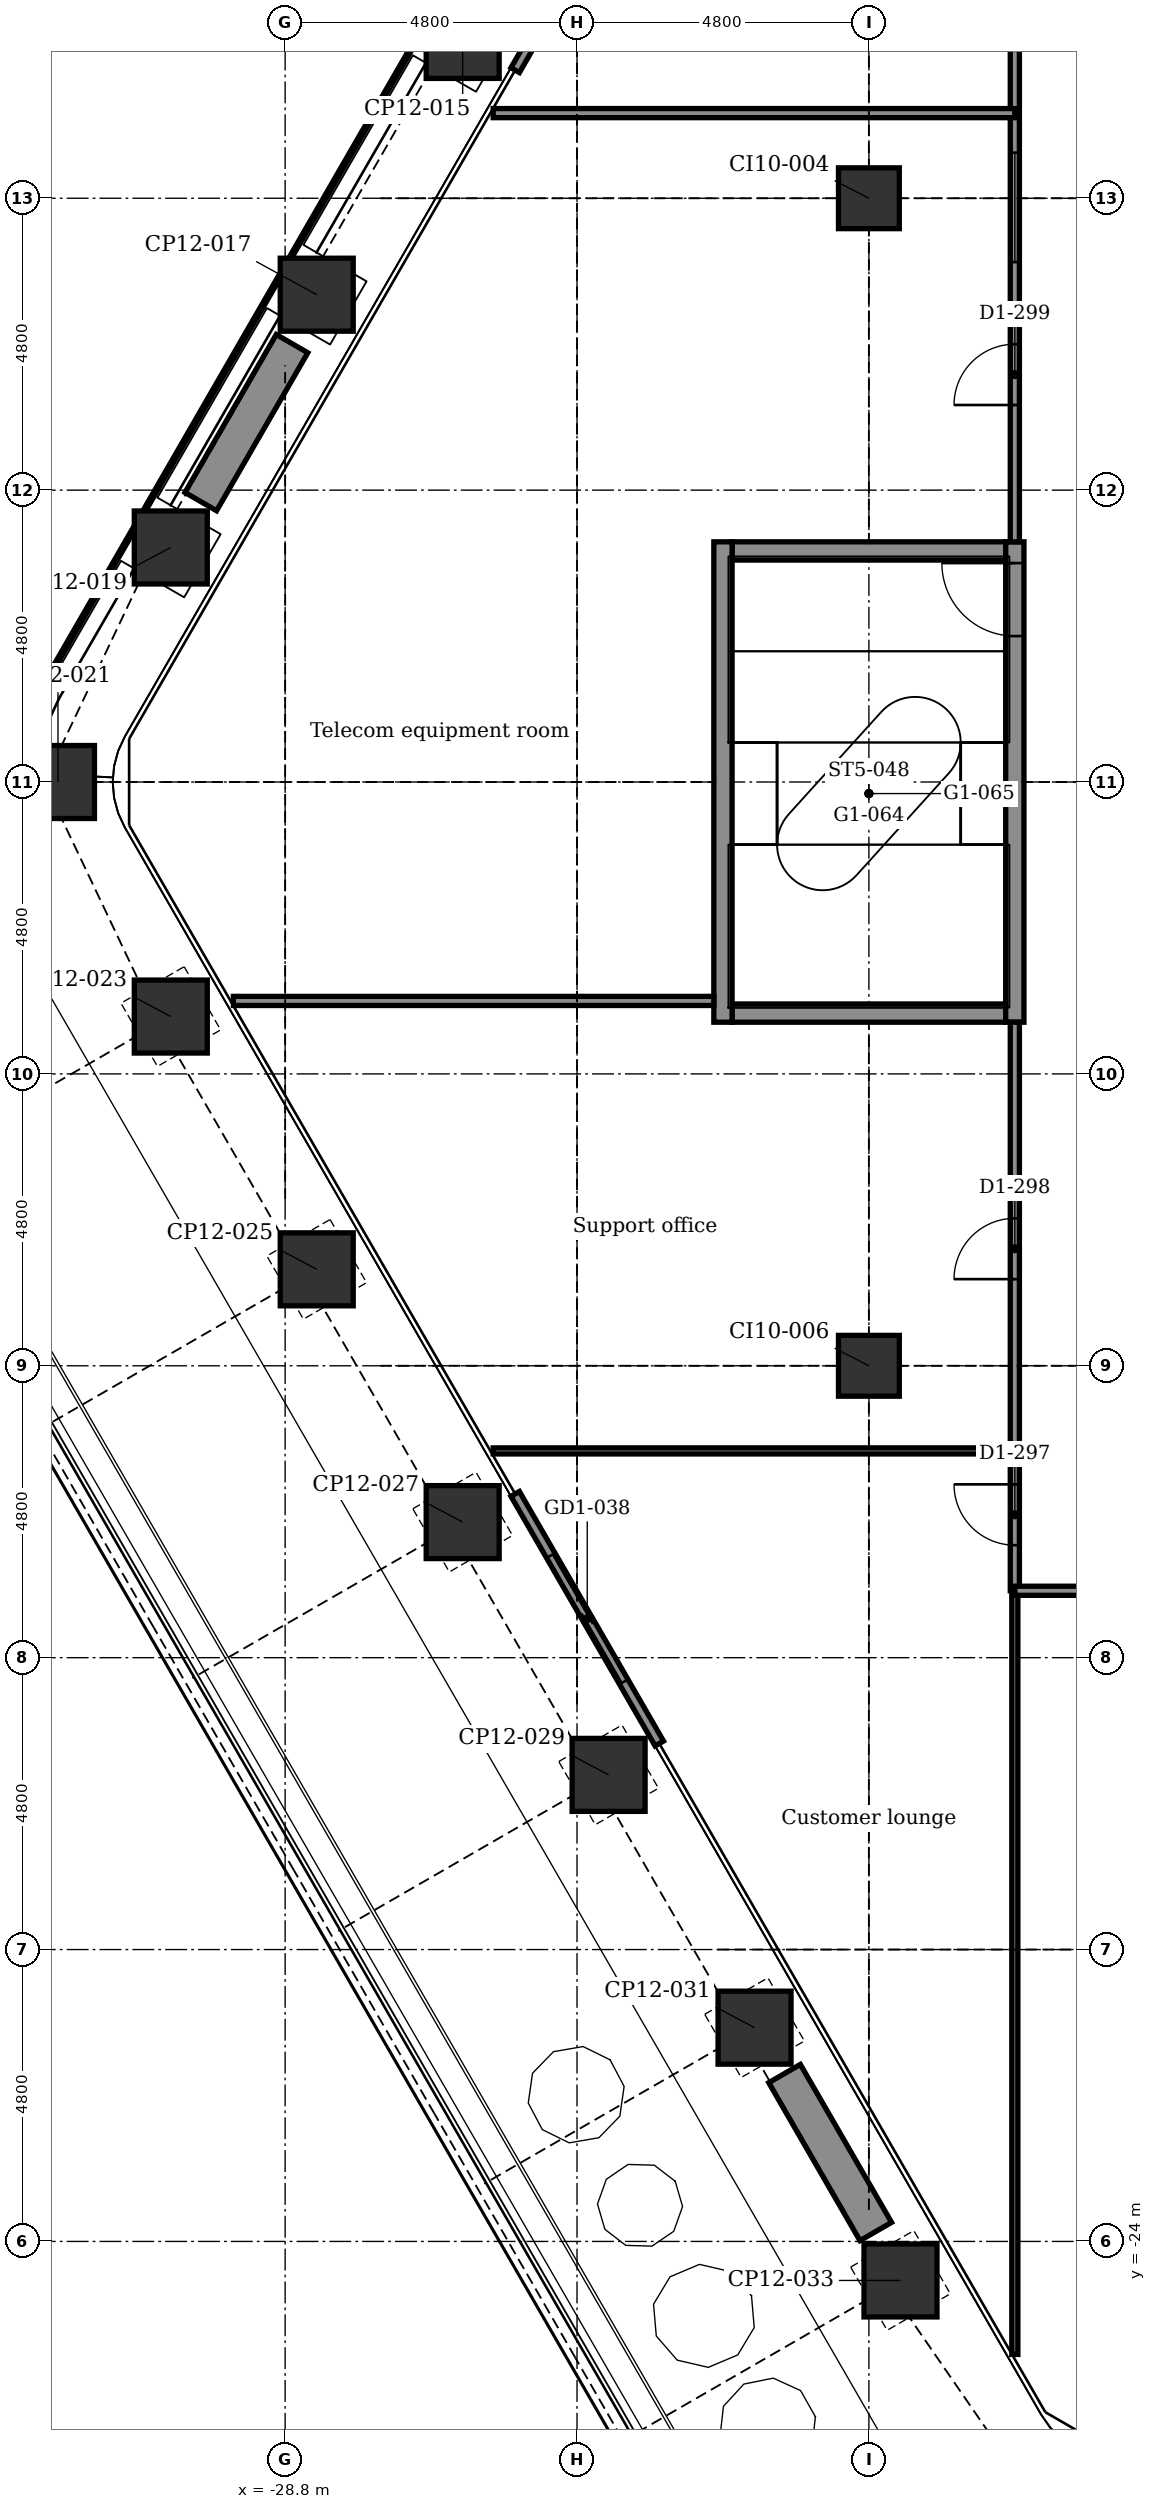
"""IFC4 building model, lengths in metres.
Left out: names, types, materials, properties, quantities, classifications, styles, units other than length and angle.
Written with IfcOpenShell. Run it as: python <this file> out.ifc"""

import sys

from ifc_helpers import new_model, si_unit, direction, frame, frame_2d, origin, origin_2d, place, context, subcontext, project, spatial, rectangle, extrude, element, fill, save


model = new_model("IFC4")
c1 = context("Model", 3, precision=1e-05, world=origin(), true_north=direction((0.0, 1.0)))
c2 = subcontext(c1, "Body", "Model", "MODEL_VIEW")
j1 = project(units=[si_unit("LENGTHUNIT", "METRE"), si_unit("PLANEANGLEUNIT", "RADIAN")], contexts=[c1])
p1 = place(None, origin())
s1 = spatial("IfcSite", under=j1, at=p1, CompositionType="ELEMENT")
p2 = place(p1, origin())
s2 = spatial("IfcBuilding", under=s1, at=p2, CompositionType="ELEMENT")
p3 = place(p2, frame((0.0, 0.0, 109.4)))
s3 = spatial("IfcBuildingStorey", under=s2, at=p3, CompositionType="ELEMENT", Elevation=109.4)
for number, where, z_axis, x_axis in (
    (1, (-18.68, -24.642, -0.2), (0.0, 0.0, 1.0), (0.866, 0.5, 0.0)),
    (2, (-21.08, -20.485, -0.2), (0.0, 0.0, 1.0), (0.866, 0.5, 0.0)),
    (3, (-23.48, -16.328, -0.2), (0.0, 0.0, 1.0), (0.866, 0.5, 0.0)),
    (4, (-25.88, -12.171, -0.2), (0.0, 0.0, 1.0), (0.866, 0.5, 0.0)),
    (5, (-28.28, -8.014, -0.2), (0.0, 0.0, 1.0), (0.866, 0.5, 0.0)),
    (6, (-30.68, -3.857, -0.2), (0.0, 0.0, 1.0), (0.866, 0.5, 0.0)),
    (7, (-32.536, 0.0, -0.2), (0.0, 0.0, 1.0), (1.0, 0.0, 0.0)),
    (8, (-30.68, 3.857, -0.2), (0.0, 0.0, 1.0), (0.5, 0.866, 0.0)),
    (9, (-28.28, 8.014, -0.2), (0.0, 0.0, 1.0), (0.5, 0.866, 0.0)),
    (10, (-25.88, 12.171, -0.2), (0.0, 0.0, 1.0), (0.5, 0.866, 0.0)),
):
    element("IfcColumn", number, at=place(p3, frame(where, z_axis=z_axis, x_axis=x_axis)), inside=s3, PredefinedType="COLUMN", context=c2, shape_type="SweptSolid", body=[
        extrude(rectangle(XDim=1.2, YDim=1.2, at=origin_2d()), origin(), (0.0, 0.0, 1.0), 4.5),
    ])
for number, where, z_axis, x_axis in (
    (11, (-19.2, -9.6, -0.2), (0.0, 0.0, 1.0), (1.0, 0.0, 0.0)),
    (12, (-19.2, 9.6, -0.2), (0.0, 0.0, 1.0), (1.0, 0.0, 0.0)),
):
    element("IfcColumn", number, at=place(p3, frame(where, z_axis=z_axis, x_axis=x_axis)), inside=s3, PredefinedType="COLUMN", context=c2, shape_type="SweptSolid", body=[
        extrude(rectangle(XDim=1.0, YDim=1.0, at=origin_2d()), origin(), (0.0, 0.0, 1.0), 4.5),
    ])
for number, where, z_axis, x_axis in (
    (13, (-21.45, -3.8, -0.2), (0.0, 0.0, 1.0), (1.0, 0.0, 0.0)),
    (14, (-21.45, 3.8, -0.2), (0.0, 0.0, 1.0), (1.0, 0.0, 0.0)),
):
    element("IfcWall", number, at=place(p3, frame(where, z_axis=z_axis, x_axis=x_axis)), inside=s3, PredefinedType="STANDARD", context=c2, shape_type="SweptSolid", body=[
        extrude(rectangle(XDim=4.5, YDim=0.3, at=frame_2d((2.25, 0.0))), origin(), (0.0, 0.0, 1.0), 4.5),
    ])
p4 = place(p3, frame((-21.6, -3.95, -0.2), z_axis=(0.0, 0.0, 1.0), x_axis=(0.0, 1.0, 0.0)))
e15 = element("IfcWall", 15, at=p4, inside=s3, PredefinedType="STANDARD", context=c2, shape_type="SweptSolid", body=[
    extrude(rectangle(XDim=7.9, YDim=0.3, at=frame_2d((3.95, 0.0))), origin(), (0.0, 0.0, 1.0), 4.5),
])
p5 = place(p3, frame((-16.8, -3.95, -0.2), z_axis=(0.0, 0.0, 1.0), x_axis=(0.0, 1.0, 0.0)))
e16 = element("IfcWall", 16, at=p5, inside=s3, PredefinedType="STANDARD", context=c2, shape_type="SweptSolid", body=[
    extrude(rectangle(XDim=7.9, YDim=0.3, at=frame_2d((3.95, 0.0))), origin(), (0.0, 0.0, 1.0), 4.5),
])
p6 = place(p5, frame((6.35, 0.0, 0.2)))
e17 = element("IfcOpeningElement", 17, at=p6, cuts=e16, PredefinedType="OPENING", context=c2, shape_type="SweptSolid", body=[
    extrude(rectangle(XDim=1.2, YDim=2.1, at=frame_2d((0.6, 1.05))), frame((0.0, 0.16, 0.0), z_axis=(0.0, -1.0, 0.0), x_axis=(1.0, 0.0, 0.0)), (0.0, 0.0, 1.0), 0.32),
])
p7 = place(p3, frame((-22.647, -15.812, 0.0), z_axis=(0.0, 0.0, 1.0), x_axis=(-0.499978080042, 0.866038058908, 0.0)))
e18 = element("IfcWall", 18, at=p7, inside=s3, PredefinedType="PARTITIONING", context=c2, shape_type="SweptSolid", body=[
    extrude(rectangle(XDim=4.74, YDim=0.16, at=frame_2d((2.37, 0.0))), origin(), (0.0, 0.0, 1.0), 4.3),
])
p8 = place(p7, frame((1.17, 0.0, 0.0)))
e19 = element("IfcOpeningElement", 19, at=p8, cuts=e18, PredefinedType="OPENING", context=c2, shape_type="SweptSolid", body=[
    extrude(rectangle(XDim=2.4, YDim=2.4, at=frame_2d((1.2, 1.2))), frame((0.0, 0.09, 0.0), z_axis=(0.0, -1.0, 0.0), x_axis=(1.0, 0.0, 0.0)), (0.0, 0.0, 1.0), 0.18),
])
p9 = place(p3, frame((-25.017, 11.707, 0.0), z_axis=(0.0, 0.0, 1.0), x_axis=(0.499978080042, 0.866038058908, 0.0)))
e20 = element("IfcWall", 20, at=p9, inside=s3, PredefinedType="PARTITIONING", context=c2, shape_type="SweptSolid", body=[
    extrude(rectangle(XDim=4.74, YDim=0.16, at=frame_2d((2.37, 0.0))), origin(), (0.0, 0.0, 1.0), 4.3),
])
p10 = place(p9, frame((1.17, 0.0, 0.0)))
e21 = element("IfcOpeningElement", 21, at=p10, cuts=e20, PredefinedType="OPENING", context=c2, shape_type="SweptSolid", body=[
    extrude(rectangle(XDim=2.4, YDim=2.4, at=frame_2d((1.2, 1.2))), frame((0.0, 0.09, 0.0), z_axis=(0.0, -1.0, 0.0), x_axis=(1.0, 0.0, 0.0)), (0.0, 0.0, 1.0), 0.18),
])
for number, where, z_axis, x_axis in (
    (22, (-19.087, -23.837, 0.0), (0.0, 0.0, 1.0), (-0.5, 0.866, 0.0)),
    (23, (-30.187, 4.611, 0.0), (0.0, 0.0, 1.0), (0.5, 0.866, 0.0)),
):
    element("IfcWall", number, at=place(p3, frame(where, z_axis=z_axis, x_axis=x_axis)), inside=s3, PredefinedType="USERDEFINED", context=c2, shape_type="SweptSolid", body=[
        extrude(rectangle(XDim=3.0, YDim=0.6, at=frame_2d((1.5, 0.0))), origin(), (0.0, 0.0, 1.0), 0.7),
    ])
p11 = place(p3, frame((-16.8, -25.858, 0.0), z_axis=(0.0, 0.0, 1.0), x_axis=(0.0, 1.0, 0.0)))
e24 = element("IfcWall", 24, at=p11, inside=s3, PredefinedType="PARTITIONING", context=c2, shape_type="SweptSolid", body=[
    extrude(rectangle(XDim=12.558, YDim=0.1, at=frame_2d((6.279, 0.0))), origin(), (0.0, 0.0, 1.0), 4.3),
])
p12 = place(p3, frame((-16.8, -13.3, 0.0), z_axis=(0.0, 0.0, 1.0), x_axis=(0.0, 1.0, 0.0)))
e25 = element("IfcWall", 25, at=p12, inside=s3, PredefinedType="PARTITIONING", context=c2, shape_type="SweptSolid", body=[
    extrude(rectangle(XDim=9.35, YDim=0.15, at=frame_2d((4.675, 0.0))), origin(), (0.0, 0.0, 1.0), 4.3),
])
p13 = place(p12, frame((0.75, 0.0, 0.0)))
e26 = element("IfcOpeningElement", 26, at=p13, cuts=e25, PredefinedType="OPENING", context=c2, shape_type="SweptSolid", body=[
    extrude(rectangle(XDim=1.0, YDim=2.1, at=frame_2d((0.5, 1.05))), frame((0.0, 0.085, 0.0), z_axis=(0.0, -1.0, 0.0), x_axis=(1.0, 0.0, 0.0)), (0.0, 0.0, 1.0), 0.17),
])
p14 = place(p12, frame((5.125, 0.0, 0.0)))
e27 = element("IfcOpeningElement", 27, at=p14, cuts=e25, PredefinedType="OPENING", context=c2, shape_type="SweptSolid", body=[
    extrude(rectangle(XDim=1.0, YDim=2.1, at=frame_2d((0.5, 1.05))), frame((0.0, 0.085, 0.0), z_axis=(0.0, -1.0, 0.0), x_axis=(1.0, 0.0, 0.0)), (0.0, 0.0, 1.0), 0.17),
])
p15 = place(p3, frame((-16.8, 3.95, 0.0), z_axis=(0.0, 0.0, 1.0), x_axis=(0.0, 1.0, 0.0)))
e28 = element("IfcWall", 28, at=p15, inside=s3, PredefinedType="PARTITIONING", context=c2, shape_type="SweptSolid", body=[
    extrude(rectangle(XDim=8.75, YDim=0.15, at=frame_2d((4.375, 0.0))), origin(), (0.0, 0.0, 1.0), 4.3),
])
p16 = place(p15, frame((2.25, 0.0, 0.0)))
e29 = element("IfcOpeningElement", 29, at=p16, cuts=e28, PredefinedType="OPENING", context=c2, shape_type="SweptSolid", body=[
    extrude(rectangle(XDim=1.0, YDim=2.1, at=frame_2d((0.5, 1.05))), frame((0.0, 0.085, 0.0), z_axis=(0.0, -1.0, 0.0), x_axis=(1.0, 0.0, 0.0)), (0.0, 0.0, 1.0), 0.17),
])
p17 = place(p15, frame((4.6, 0.0, 0.9)))
e30 = element("IfcOpeningElement", 30, at=p17, cuts=e28, PredefinedType="OPENING", context=c2, shape_type="SweptSolid", body=[
    extrude(rectangle(XDim=1.8, YDim=1.5, at=frame_2d((0.9, 0.75))), frame((0.0, 0.085, 0.0), z_axis=(0.0, -1.0, 0.0), x_axis=(1.0, 0.0, 0.0)), (0.0, 0.0, 1.0), 0.17),
])
p18 = place(p3, frame((-16.8, -13.3, 0.0), z_axis=(0.0, 0.0, 1.0), x_axis=(1.0, 0.0, 0.0)))
e31 = element("IfcWall", 31, at=p18, inside=s3, PredefinedType="PARTITIONING", context=c2, shape_type="SweptSolid", body=[
    extrude(rectangle(XDim=33.6, YDim=0.15, at=frame_2d((16.8, 0.0))), origin(), (0.0, 0.0, 1.0), 4.3),
])
p19 = place(p18, frame((8.55, 0.0, 0.0)))
e32 = element("IfcOpeningElement", 32, at=p19, cuts=e31, PredefinedType="OPENING", context=c2, shape_type="SweptSolid", body=[
    extrude(rectangle(XDim=0.9, YDim=2.1, at=frame_2d((0.45, 1.05))), frame((0.0, 0.085, 0.0), z_axis=(0.0, -1.0, 0.0), x_axis=(1.0, 0.0, 0.0)), (0.0, 0.0, 1.0), 0.17),
])
p20 = place(p18, frame((11.55, 0.0, 0.0)))
e33 = element("IfcOpeningElement", 33, at=p20, cuts=e31, PredefinedType="OPENING", context=c2, shape_type="SweptSolid", body=[
    extrude(rectangle(XDim=0.9, YDim=2.1, at=frame_2d((0.45, 1.05))), frame((0.0, 0.085, 0.0), z_axis=(0.0, -1.0, 0.0), x_axis=(1.0, 0.0, 0.0)), (0.0, 0.0, 1.0), 0.17),
])
p21 = place(p18, frame((4.955, 0.0, 0.0)))
e34 = element("IfcOpeningElement", 34, at=p21, cuts=e31, PredefinedType="OPENING", context=c2, shape_type="SweptSolid", body=[
    extrude(rectangle(XDim=1.0, YDim=2.1, at=frame_2d((0.5, 1.05))), frame((0.0, 0.085, 0.0), z_axis=(0.0, -1.0, 0.0), x_axis=(1.0, 0.0, 0.0)), (0.0, 0.0, 1.0), 0.17),
])
p22 = place(p18, frame((15.025, 0.0, 0.0)))
e35 = element("IfcOpeningElement", 35, at=p22, cuts=e31, PredefinedType="OPENING", context=c2, shape_type="SweptSolid", body=[
    extrude(rectangle(XDim=1.0, YDim=2.1, at=frame_2d((0.5, 1.05))), frame((0.0, 0.085, 0.0), z_axis=(0.0, -1.0, 0.0), x_axis=(1.0, 0.0, 0.0)), (0.0, 0.0, 1.0), 0.17),
])
p23 = place(p18, frame((23.5, 0.0, 0.0)))
e36 = element("IfcOpeningElement", 36, at=p23, cuts=e31, PredefinedType="OPENING", context=c2, shape_type="SweptSolid", body=[
    extrude(rectangle(XDim=1.0, YDim=2.1, at=frame_2d((0.5, 1.05))), frame((0.0, 0.085, 0.0), z_axis=(0.0, -1.0, 0.0), x_axis=(1.0, 0.0, 0.0)), (0.0, 0.0, 1.0), 0.17),
])
p24 = place(p18, frame((27.645, 0.0, 0.0)))
e37 = element("IfcOpeningElement", 37, at=p24, cuts=e31, PredefinedType="OPENING", context=c2, shape_type="SweptSolid", body=[
    extrude(rectangle(XDim=1.0, YDim=2.1, at=frame_2d((0.5, 1.05))), frame((0.0, 0.085, 0.0), z_axis=(0.0, -1.0, 0.0), x_axis=(1.0, 0.0, 0.0)), (0.0, 0.0, 1.0), 0.17),
])
p25 = place(p18, frame((19.135, 0.0, 0.0)))
e38 = element("IfcOpeningElement", 38, at=p25, cuts=e31, PredefinedType="OPENING", context=c2, shape_type="SweptSolid", body=[
    extrude(rectangle(XDim=1.0, YDim=2.1, at=frame_2d((0.5, 1.05))), frame((0.0, 0.085, 0.0), z_axis=(0.0, -1.0, 0.0), x_axis=(1.0, 0.0, 0.0)), (0.0, 0.0, 1.0), 0.17),
])
p26 = place(p3, frame((-25.378, -11.0, 0.0), z_axis=(0.0, 0.0, 1.0), x_axis=(1.0, 0.0, 0.0)))
e39 = element("IfcWall", 39, at=p26, inside=s3, PredefinedType="PARTITIONING", context=c2, shape_type="SweptSolid", body=[
    extrude(rectangle(XDim=8.578, YDim=0.1, at=frame_2d((4.289, 0.0))), origin(), (0.0, 0.0, 1.0), 4.3),
])
p27 = place(p3, frame((-29.651, -3.6, 0.0), z_axis=(0.0, 0.0, 1.0), x_axis=(1.0, 0.0, 0.0)))
e40 = element("IfcWall", 40, at=p27, inside=s3, PredefinedType="PARTITIONING", context=c2, shape_type="SweptSolid", body=[
    extrude(rectangle(XDim=7.901, YDim=0.15, at=frame_2d((3.95, 0.0))), origin(), (0.0, 0.0, 1.0), 4.3),
])
p28 = place(p3, frame((-25.378, 11.0, 0.0), z_axis=(0.0, 0.0, 1.0), x_axis=(1.0, 0.0, 0.0)))
e41 = element("IfcWall", 41, at=p28, inside=s3, PredefinedType="PARTITIONING", context=c2, shape_type="SweptSolid", body=[
    extrude(rectangle(XDim=8.578, YDim=0.15, at=frame_2d((4.289, 0.0))), origin(), (0.0, 0.0, 1.0), 4.3),
])
p29 = place(p8, origin())
e42 = element("IfcDoor", 42, at=p29, inside=s3, OperationType="DOUBLE_DOOR_SLIDING", PredefinedType="DOOR", context=c2, shape_type="SweptSolid", body=[
    extrude(rectangle(XDim=2.4, YDim=2.4, at=frame_2d((1.2, 1.2))), frame((0.0, 0.025, 0.0), z_axis=(0.0, -1.0, 0.0), x_axis=(1.0, 0.0, 0.0)), (0.0, 0.0, 1.0), 0.05),
])
fill(e19, e42)
p30 = place(p13, origin())
e43 = element("IfcDoor", 43, at=p30, inside=s3, OperationType="SINGLE_SWING_RIGHT", PredefinedType="DOOR", context=c2, shape_type="SweptSolid", body=[
    extrude(rectangle(XDim=1.0, YDim=2.1, at=frame_2d((0.5, 1.05))), frame((0.0, 0.025, 0.0), z_axis=(0.0, -1.0, 0.0), x_axis=(1.0, 0.0, 0.0)), (0.0, 0.0, 1.0), 0.05),
])
fill(e26, e43)
p31 = place(p14, origin())
e44 = element("IfcDoor", 44, at=p31, inside=s3, OperationType="SINGLE_SWING_LEFT", PredefinedType="DOOR", context=c2, shape_type="SweptSolid", body=[
    extrude(rectangle(XDim=1.0, YDim=2.1, at=frame_2d((0.5, 1.05))), frame((0.0, 0.025, 0.0), z_axis=(0.0, -1.0, 0.0), x_axis=(1.0, 0.0, 0.0)), (0.0, 0.0, 1.0), 0.05),
])
fill(e27, e44)
p32 = place(p16, origin())
e45 = element("IfcDoor", 45, at=p32, inside=s3, OperationType="SINGLE_SWING_LEFT", PredefinedType="DOOR", context=c2, shape_type="SweptSolid", body=[
    extrude(rectangle(XDim=1.0, YDim=2.1, at=frame_2d((0.5, 1.05))), frame((0.0, 0.025, 0.0), z_axis=(0.0, -1.0, 0.0), x_axis=(1.0, 0.0, 0.0)), (0.0, 0.0, 1.0), 0.05),
])
fill(e29, e45)
p33 = place(p6, origin())
e46 = element("IfcDoor", 46, at=p33, inside=s3, OperationType="SINGLE_SWING_RIGHT", PredefinedType="DOOR", context=c2, shape_type="SweptSolid", body=[
    extrude(rectangle(XDim=1.2, YDim=2.1, at=frame_2d((0.6, 1.05))), frame((0.0, 0.025, 0.0), z_axis=(0.0, -1.0, 0.0), x_axis=(1.0, 0.0, 0.0)), (0.0, 0.0, 1.0), 0.05),
])
fill(e17, e46)
p34 = place(p17, origin())
e47 = element("IfcWindow", 47, at=p34, inside=s3, PartitioningType="SINGLE_PANEL", PredefinedType="WINDOW", context=c2, shape_type="SweptSolid", body=[
    extrude(rectangle(XDim=1.8, YDim=1.5, at=frame_2d((0.9, 0.75))), frame((0.0, 0.03, 0.0), z_axis=(0.0, -1.0, 0.0), x_axis=(1.0, 0.0, 0.0)), (0.0, 0.0, 1.0), 0.06),
])
fill(e30, e47)
save(model, sys.argv[1])
